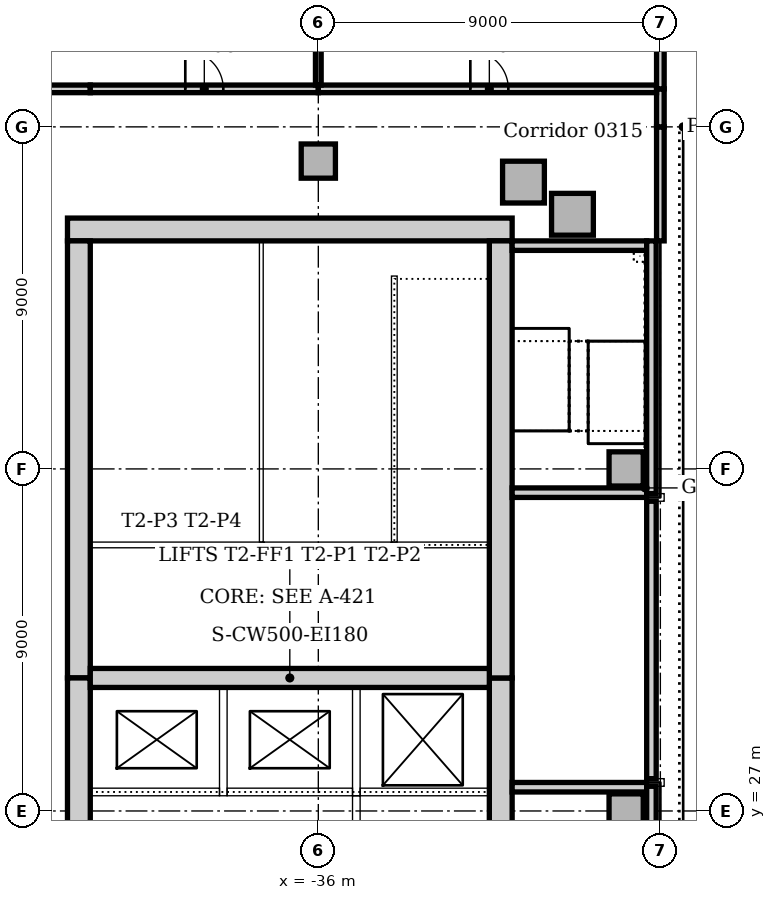
"""IFC4 building model, lengths in metres.
Left out: names, types, materials, properties, quantities, classifications, styles, units other than length and angle.
Written with IfcOpenShell. Run it as: python <this file> out.ifc"""

import sys

from ifc_helpers import new_model, si_unit, direction, frame, frame_2d, origin, origin_2d, place, context, subcontext, project, spatial, rectangle, extrude, element, fill, save


model = new_model("IFC4")
c1 = context("Model", 3, precision=1e-05, world=origin(), true_north=direction((0.0, 1.0)))
c2 = subcontext(c1, "Body", "Model", "MODEL_VIEW")
j1 = project(units=[si_unit("LENGTHUNIT", "METRE"), si_unit("PLANEANGLEUNIT", "RADIAN")], contexts=[c1])
p1 = place(None, origin())
s1 = spatial("IfcSite", under=j1, at=p1, CompositionType="ELEMENT")
p2 = place(p1, origin())
s2 = spatial("IfcBuilding", under=s1, at=p2, CompositionType="ELEMENT")
p3 = place(p2, frame((0.0, 0.0, 16.0)))
s3 = spatial("IfcBuildingStorey", under=s2, at=p3, CompositionType="ELEMENT", Elevation=16.0)
p4 = place(p3, frame((-30.9, 42.3, 0.0), z_axis=(0.0, 0.0, 1.0), x_axis=(-1.0, 0.0, 0.0)))
e1 = element("IfcWall", 1, at=p4, inside=s3, PredefinedType="SOLIDWALL", context=c2, shape_type="SweptSolid", body=[
    extrude(rectangle(XDim=11.7, YDim=0.6, at=frame_2d((5.85, 0.0))), origin(), (0.0, 0.0, 1.0), 5.0),
])
p5 = place(p3, frame((-31.2, 21.0, 0.0), z_axis=(0.0, 0.0, 1.0), x_axis=(0.0, 1.0, 0.0)))
e2 = element("IfcWall", 2, at=p5, inside=s3, PredefinedType="SOLIDWALL", context=c2, shape_type="SweptSolid", body=[
    extrude(rectangle(XDim=9.5, YDim=0.6, at=frame_2d((4.75, 0.0))), origin(), (0.0, 0.0, 1.0), 5.0),
])
p6 = place(p5, frame((5.25, 0.0, 0.0)))
e3 = element("IfcOpeningElement", 3, at=p6, cuts=e2, PredefinedType="OPENING", context=c2, shape_type="SweptSolid", body=[
    extrude(rectangle(XDim=1.0, YDim=2.1, at=frame_2d((0.5, 1.05))), frame((0.0, 0.31, 0.0), z_axis=(0.0, -1.0, 0.0), x_axis=(1.0, 0.0, 0.0)), (0.0, 0.0, 1.0), 0.62),
])
p7 = place(p3, frame((-31.2, 30.5, 0.0), z_axis=(0.0, 0.0, 1.0), x_axis=(0.0, 1.0, 0.0)))
e4 = element("IfcWall", 4, at=p7, inside=s3, PredefinedType="SOLIDWALL", context=c2, shape_type="SweptSolid", body=[
    extrude(rectangle(XDim=11.5, YDim=0.6, at=frame_2d((5.75, 0.0))), origin(), (0.0, 0.0, 1.0), 5.0),
])
p8 = place(p7, frame((0.85, 0.0, 0.0)))
e5 = element("IfcOpeningElement", 5, at=p8, cuts=e4, PredefinedType="OPENING", context=c2, shape_type="SweptSolid", body=[
    extrude(rectangle(XDim=1.8, YDim=2.1, at=frame_2d((0.9, 1.05))), frame((0.0, 0.31, 0.0), z_axis=(0.0, -1.0, 0.0), x_axis=(1.0, 0.0, 0.0)), (0.0, 0.0, 1.0), 0.62),
])
p9 = place(p3, frame((-42.3, 42.0, 0.0), z_axis=(0.0, 0.0, 1.0), x_axis=(0.0, -1.0, 0.0)))
e6 = element("IfcWall", 6, at=p9, inside=s3, PredefinedType="SOLIDWALL", context=c2, shape_type="SweptSolid", body=[
    extrude(rectangle(XDim=11.5, YDim=0.6, at=frame_2d((5.75, 0.0))), origin(), (0.0, 0.0, 1.0), 5.0),
])
p10 = place(p9, frame((8.85, 0.0, 0.0)))
e7 = element("IfcOpeningElement", 7, at=p10, cuts=e6, PredefinedType="OPENING", context=c2, shape_type="SweptSolid", body=[
    extrude(rectangle(XDim=1.8, YDim=2.1, at=frame_2d((0.9, 1.05))), frame((0.0, 0.31, 0.0), z_axis=(0.0, -1.0, 0.0), x_axis=(1.0, 0.0, 0.0)), (0.0, 0.0, 1.0), 0.62),
])
p11 = place(p3, frame((-42.3, 30.5, 0.0), z_axis=(0.0, 0.0, 1.0), x_axis=(0.0, -1.0, 0.0)))
e8 = element("IfcWall", 8, at=p11, inside=s3, PredefinedType="SOLIDWALL", context=c2, shape_type="SweptSolid", body=[
    extrude(rectangle(XDim=9.5, YDim=0.6, at=frame_2d((4.75, 0.0))), origin(), (0.0, 0.0, 1.0), 5.0),
])
p12 = place(p11, frame((3.85, 0.0, 0.0)))
e9 = element("IfcOpeningElement", 9, at=p12, cuts=e8, PredefinedType="OPENING", context=c2, shape_type="SweptSolid", body=[
    extrude(rectangle(XDim=1.8, YDim=2.1, at=frame_2d((0.9, 1.05))), frame((0.0, 0.31, 0.0), z_axis=(0.0, -1.0, 0.0), x_axis=(1.0, 0.0, 0.0)), (0.0, 0.0, 1.0), 0.62),
])
p13 = place(p3, frame((-42.0, 30.5, 0.0), z_axis=(0.0, 0.0, 1.0), x_axis=(1.0, 0.0, 0.0)))
e10 = element("IfcWall", 10, at=p13, inside=s3, PredefinedType="SOLIDWALL", context=c2, shape_type="SweptSolid", body=[
    extrude(rectangle(XDim=10.5, YDim=0.5, at=frame_2d((5.25, 0.0))), origin(), (0.0, 0.0, 1.0), 5.0),
])
p14 = place(p3, frame((-27.36, 27.625, 0.0), z_axis=(0.0, 0.0, 1.0), x_axis=(-1.0, 0.0, 0.0)))
e11 = element("IfcWall", 11, at=p14, inside=s3, PredefinedType="SOLIDWALL", context=c2, shape_type="SweptSolid", body=[
    extrude(rectangle(XDim=3.54, YDim=0.25, at=frame_2d((1.77, 0.0))), origin(), (0.0, 0.0, 1.0), 5.0),
])
p15 = place(p14, frame((1.69, 0.0, 0.0)))
e12 = element("IfcOpeningElement", 12, at=p15, cuts=e11, PredefinedType="OPENING", context=c2, shape_type="SweptSolid", body=[
    extrude(rectangle(XDim=1.1, YDim=2.1, at=frame_2d((0.55, 1.05))), frame((0.0, 0.135, 0.0), z_axis=(0.0, -1.0, 0.0), x_axis=(1.0, 0.0, 0.0)), (0.0, 0.0, 1.0), 0.27),
])
p16 = place(p3, frame((-30.9, 35.375, 0.0), z_axis=(0.0, 0.0, 1.0), x_axis=(1.0, 0.0, 0.0)))
e13 = element("IfcWall", 13, at=p16, inside=s3, PredefinedType="SOLIDWALL", context=c2, shape_type="SweptSolid", body=[
    extrude(rectangle(XDim=3.54, YDim=0.25, at=frame_2d((1.77, 0.0))), origin(), (0.0, 0.0, 1.0), 5.0),
])
p17 = place(p16, frame((0.75, 0.0, 0.0)))
e14 = element("IfcOpeningElement", 14, at=p17, cuts=e13, PredefinedType="OPENING", context=c2, shape_type="SweptSolid", body=[
    extrude(rectangle(XDim=1.1, YDim=2.1, at=frame_2d((0.55, 1.05))), frame((0.0, 0.135, 0.0), z_axis=(0.0, -1.0, 0.0), x_axis=(1.0, 0.0, 0.0)), (0.0, 0.0, 1.0), 0.27),
])
p18 = place(p3, frame((-27.36, 41.875, 0.0), z_axis=(0.0, 0.0, 1.0), x_axis=(-1.0, 0.0, 0.0)))
e15 = element("IfcWall", 15, at=p18, inside=s3, PredefinedType="SOLIDWALL", context=c2, shape_type="SweptSolid", body=[
    extrude(rectangle(XDim=3.54, YDim=0.25, at=frame_2d((1.77, 0.0))), origin(), (0.0, 0.0, 1.0), 5.0),
])
p19 = place(p3, frame((-27.235, 21.0, 0.0), z_axis=(0.0, 0.0, 1.0), x_axis=(0.0, 1.0, 0.0)))
e16 = element("IfcWall", 16, at=p19, inside=s3, PredefinedType="SOLIDWALL", context=c2, shape_type="SweptSolid", body=[
    extrude(rectangle(XDim=6.65, YDim=0.25, at=frame_2d((3.325, 0.0))), origin(), (0.0, 0.0, 1.0), 5.0),
])
p20 = place(p3, frame((-27.235, 27.85, 0.0), z_axis=(0.0, 0.0, 1.0), x_axis=(0.0, 1.0, 0.0)))
e17 = element("IfcWall", 17, at=p20, inside=s3, PredefinedType="SOLIDWALL", context=c2, shape_type="SweptSolid", body=[
    extrude(rectangle(XDim=7.3, YDim=0.25, at=frame_2d((3.65, 0.0))), origin(), (0.0, 0.0, 1.0), 5.0),
])
p21 = place(p3, frame((-27.235, 35.35, 0.0), z_axis=(0.0, 0.0, 1.0), x_axis=(0.0, 1.0, 0.0)))
e18 = element("IfcWall", 18, at=p21, inside=s3, PredefinedType="SOLIDWALL", context=c2, shape_type="SweptSolid", body=[
    extrude(rectangle(XDim=6.65, YDim=0.25, at=frame_2d((3.325, 0.0))), origin(), (0.0, 0.0, 1.0), 5.0),
])
for number, where, z_axis, x_axis in (
    (19, (-29.313, 42.7, 0.0), (0.0, 0.0, 1.0), (1.0, 0.0, 0.0)),
    (20, (-30.602, 43.547, 0.0), (0.0, 0.0, 1.0), (1.0, 0.0, 0.0)),
):
    element("IfcColumn", number, at=place(p3, frame(where, z_axis=z_axis, x_axis=x_axis)), inside=s3, PredefinedType="COLUMN", context=c2, shape_type="SweptSolid", body=[
        extrude(rectangle(XDim=1.1, YDim=1.1, at=origin_2d()), origin(), (0.0, 0.0, 1.0), 4.7),
    ])
for number, where, z_axis, x_axis in (
    (21, (-27.9, 27.0, 0.0), (0.0, 0.0, 1.0), (1.0, 0.0, 0.0)),
    (22, (-27.9, 36.0, 0.0), (0.0, 0.0, 1.0), (1.0, 0.0, 0.0)),
):
    element("IfcColumn", number, at=place(p3, frame(where, z_axis=z_axis, x_axis=x_axis)), inside=s3, PredefinedType="COLUMN", context=c2, shape_type="SweptSolid", body=[
        extrude(rectangle(XDim=0.9, YDim=0.9, at=origin_2d()), origin(), (0.0, 0.0, 1.0), 5.0),
    ])
p22 = place(p3, frame((-36.0, 44.1, 0.0), z_axis=(0.0, 0.0, 1.0), x_axis=(1.0, 0.0, 0.0)))
e23 = element("IfcColumn", 23, at=p22, inside=s3, PredefinedType="COLUMN", context=c2, shape_type="SweptSolid", body=[
    extrude(rectangle(XDim=0.9, YDim=0.9, at=origin_2d()), origin(), (0.0, 0.0, 1.0), 4.7),
])
p23 = place(p3, frame((-44.9, 46.0, 0.0), z_axis=(0.0, 0.0, 1.0), x_axis=(1.0, 0.0, 0.0)))
e24 = element("IfcWall", 24, at=p23, inside=s3, PredefinedType="PARTITIONING", context=c2, shape_type="SweptSolid", body=[
    extrude(rectangle(XDim=2.9, YDim=0.2, at=frame_2d((1.45, 0.0))), origin(), (0.0, 0.0, 1.0), 4.7),
])
p24 = place(p3, frame((-27.0, 42.0, 0.0), z_axis=(0.0, 0.0, 1.0), x_axis=(0.0, 1.0, 0.0)))
e25 = element("IfcWall", 25, at=p24, inside=s3, PredefinedType="PARTITIONING", context=c2, shape_type="SweptSolid", body=[
    extrude(rectangle(XDim=3.0, YDim=0.2, at=frame_2d((1.5, 0.0))), origin(), (0.0, 0.0, 1.0), 4.7),
])
p25 = place(p3, frame((-27.0, 45.0, 0.0), z_axis=(0.0, 0.0, 1.0), x_axis=(0.0, 1.0, 0.0)))
e26 = element("IfcWall", 26, at=p25, inside=s3, PredefinedType="PARTITIONING", context=c2, shape_type="SweptSolid", body=[
    extrude(rectangle(XDim=1.0, YDim=0.2, at=frame_2d((0.5, 0.0))), origin(), (0.0, 0.0, 1.0), 4.7),
])
p26 = place(p3, frame((-42.0, 46.0, 0.0), z_axis=(0.0, 0.0, 1.0), x_axis=(1.0, 0.0, 0.0)))
e27 = element("IfcWall", 27, at=p26, inside=s3, PredefinedType="PARTITIONING", context=c2, shape_type="SweptSolid", body=[
    extrude(rectangle(XDim=6.0, YDim=0.2, at=frame_2d((3.0, 0.0))), origin(), (0.0, 0.0, 1.0), 4.7),
])
p27 = place(p26, frame((2.5, 0.0, 0.0)))
e28 = element("IfcOpeningElement", 28, at=p27, cuts=e27, PredefinedType="OPENING", context=c2, shape_type="SweptSolid", body=[
    extrude(rectangle(XDim=1.0, YDim=2.1, at=frame_2d((0.5, 1.05))), frame((0.0, 0.11, 0.0), z_axis=(0.0, -1.0, 0.0), x_axis=(1.0, 0.0, 0.0)), (0.0, 0.0, 1.0), 0.22),
])
p28 = place(p3, frame((-36.0, 46.0, 0.0), z_axis=(0.0, 0.0, 1.0), x_axis=(1.0, 0.0, 0.0)))
e29 = element("IfcWall", 29, at=p28, inside=s3, PredefinedType="PARTITIONING", context=c2, shape_type="SweptSolid", body=[
    extrude(rectangle(XDim=8.9, YDim=0.2, at=frame_2d((4.45, 0.0))), origin(), (0.0, 0.0, 1.0), 4.7),
])
p29 = place(p28, frame((4.0, 0.0, 0.0)))
e30 = element("IfcOpeningElement", 30, at=p29, cuts=e29, PredefinedType="OPENING", context=c2, shape_type="SweptSolid", body=[
    extrude(rectangle(XDim=1.0, YDim=2.1, at=frame_2d((0.5, 1.05))), frame((0.0, 0.11, 0.0), z_axis=(0.0, -1.0, 0.0), x_axis=(1.0, 0.0, 0.0)), (0.0, 0.0, 1.0), 0.22),
])
p30 = place(p3, frame((-27.0, 46.0, 0.0), z_axis=(0.0, 0.0, 1.0), x_axis=(0.0, 1.0, 0.0)))
e31 = element("IfcWall", 31, at=p30, inside=s3, PredefinedType="PARTITIONING", context=c2, shape_type="SweptSolid", body=[
    extrude(rectangle(XDim=6.0, YDim=0.2, at=frame_2d((3.0, 0.0))), origin(), (0.0, 0.0, 1.0), 4.7),
])
p31 = place(p3, frame((-36.0, 46.1, 0.0), z_axis=(0.0, 0.0, 1.0), x_axis=(0.0, 1.0, 0.0)))
e32 = element("IfcWall", 32, at=p31, inside=s3, PredefinedType="PARTITIONING", context=c2, shape_type="SweptSolid", body=[
    extrude(rectangle(XDim=7.43, YDim=0.15, at=frame_2d((3.715, 0.0))), origin(), (0.0, 0.0, 1.0), 4.7),
])
p32 = place(p3, frame((-38.5, 27.4, 0.0), z_axis=(0.0, 0.0, 1.0), x_axis=(0.0, 1.0, 0.0)))
e33 = element("IfcWall", 33, at=p32, inside=s3, PredefinedType="SOLIDWALL", context=c2, shape_type="SweptSolid", body=[
    extrude(rectangle(XDim=2.85, YDim=0.2, at=frame_2d((1.425, 0.0))), origin(), (0.0, 0.0, 1.0), 5.0),
])
p33 = place(p3, frame((-42.0, 27.5, 0.0), z_axis=(0.0, 0.0, 1.0), x_axis=(1.0, 0.0, 0.0)))
e34 = element("IfcWall", 34, at=p33, inside=s3, PredefinedType="SOLIDWALL", context=c2, shape_type="SweptSolid", body=[
    extrude(rectangle(XDim=3.4, YDim=0.2, at=frame_2d((1.7, 0.0))), origin(), (0.0, 0.0, 1.0), 5.0),
])
p34 = place(p33, frame((1.5, 0.0, 0.0)))
e35 = element("IfcOpeningElement", 35, at=p34, cuts=e34, PredefinedType="OPENING", context=c2, shape_type="SweptSolid", body=[
    extrude(rectangle(XDim=1.1, YDim=2.1, at=frame_2d((0.55, 1.05))), frame((0.0, 0.11, 0.0), z_axis=(0.0, -1.0, 0.0), x_axis=(1.0, 0.0, 0.0)), (0.0, 0.0, 1.0), 0.22),
])
p35 = place(p3, frame((-35.0, 27.4, 0.0), z_axis=(0.0, 0.0, 1.0), x_axis=(0.0, 1.0, 0.0)))
e36 = element("IfcWall", 36, at=p35, inside=s3, PredefinedType="SOLIDWALL", context=c2, shape_type="SweptSolid", body=[
    extrude(rectangle(XDim=2.85, YDim=0.2, at=frame_2d((1.425, 0.0))), origin(), (0.0, 0.0, 1.0), 5.0),
])
p36 = place(p3, frame((-38.4, 27.5, 0.0), z_axis=(0.0, 0.0, 1.0), x_axis=(1.0, 0.0, 0.0)))
e37 = element("IfcWall", 37, at=p36, inside=s3, PredefinedType="SOLIDWALL", context=c2, shape_type="SweptSolid", body=[
    extrude(rectangle(XDim=3.3, YDim=0.2, at=frame_2d((1.65, 0.0))), origin(), (0.0, 0.0, 1.0), 5.0),
])
p37 = place(p36, frame((1.1, 0.0, 0.0)))
e38 = element("IfcOpeningElement", 38, at=p37, cuts=e37, PredefinedType="OPENING", context=c2, shape_type="SweptSolid", body=[
    extrude(rectangle(XDim=1.1, YDim=2.1, at=frame_2d((0.55, 1.05))), frame((0.0, 0.11, 0.0), z_axis=(0.0, -1.0, 0.0), x_axis=(1.0, 0.0, 0.0)), (0.0, 0.0, 1.0), 0.22),
])
p38 = place(p3, frame((-34.9, 27.5, 0.0), z_axis=(0.0, 0.0, 1.0), x_axis=(1.0, 0.0, 0.0)))
e39 = element("IfcWall", 39, at=p38, inside=s3, PredefinedType="SOLIDWALL", context=c2, shape_type="SweptSolid", body=[
    extrude(rectangle(XDim=3.4, YDim=0.2, at=frame_2d((1.7, 0.0))), origin(), (0.0, 0.0, 1.0), 5.0),
])
p39 = place(p38, frame((1.1, 0.0, 0.0)))
e40 = element("IfcOpeningElement", 40, at=p39, cuts=e39, PredefinedType="OPENING", context=c2, shape_type="SweptSolid", body=[
    extrude(rectangle(XDim=1.1, YDim=2.1, at=frame_2d((0.55, 1.05))), frame((0.0, 0.11, 0.0), z_axis=(0.0, -1.0, 0.0), x_axis=(1.0, 0.0, 0.0)), (0.0, 0.0, 1.0), 0.22),
])
p40 = place(p3, frame((-35.0, 24.1, 0.0), z_axis=(0.0, 0.0, 1.0), x_axis=(0.0, 1.0, 0.0)))
e41 = element("IfcWall", 41, at=p40, inside=s3, PredefinedType="SOLIDWALL", context=c2, shape_type="SweptSolid", body=[
    extrude(rectangle(XDim=3.3, YDim=0.2, at=frame_2d((1.65, 0.0))), origin(), (0.0, 0.0, 1.0), 5.0),
])
p41 = place(p40, frame((1.15, 0.0, 0.0)))
e42 = element("IfcOpeningElement", 42, at=p41, cuts=e41, PredefinedType="OPENING", context=c2, shape_type="SweptSolid", body=[
    extrude(rectangle(XDim=1.0, YDim=2.1, at=frame_2d((0.5, 1.05))), frame((0.0, 0.11, 0.0), z_axis=(0.0, -1.0, 0.0), x_axis=(1.0, 0.0, 0.0)), (0.0, 0.0, 1.0), 0.22),
])
for number, where, z_axis, x_axis in (
    (43, (-27.36, 27.75, 0.0), (0.0, 0.0, 1.0), (1.0, 0.0, 0.0)),
    (44, (-26.9, 35.25, 0.0), (0.0, 0.0, 1.0), (-1.0, 0.0, 0.0)),
):
    element("IfcWall", number, at=place(p3, frame(where, z_axis=z_axis, x_axis=x_axis)), inside=s3, PredefinedType="SOLIDWALL", context=c2, shape_type="SweptSolid", body=[
        extrude(rectangle(XDim=0.46, YDim=0.2, at=frame_2d((0.23, 0.0))), origin(), (0.0, 0.0, 1.0), 5.0),
    ])
p42 = place(p3, frame((-34.075, 34.0, 0.0), z_axis=(0.0, 0.0, 1.0), x_axis=(1.0, 0.0, 0.0)))
e45 = element("IfcWall", 45, at=p42, inside=s3, PredefinedType="SOLIDWALL", context=c2, shape_type="SweptSolid", body=[
    extrude(rectangle(XDim=2.575, YDim=0.15, at=frame_2d((1.288, 0.0))), origin(), (0.0, 0.0, 1.0), 5.0),
])
p43 = place(p3, frame((-34.0, 41.075, 0.0), z_axis=(0.0, 0.0, 1.0), x_axis=(0.0, -1.0, 0.0)))
e46 = element("IfcWall", 46, at=p43, inside=s3, PredefinedType="SOLIDWALL", context=c2, shape_type="SweptSolid", body=[
    extrude(rectangle(XDim=7.0, YDim=0.15, at=frame_2d((3.5, 0.0))), origin(), (0.0, 0.0, 1.0), 5.0),
])
p44 = place(p3, frame((-37.425, 34.0, 0.0), z_axis=(0.0, 0.0, 1.0), x_axis=(-1.0, 0.0, 0.0)))
e47 = element("IfcWall", 47, at=p44, inside=s3, PredefinedType="PARTITIONING", context=c2, shape_type="SweptSolid", body=[
    extrude(rectangle(XDim=4.575, YDim=0.15, at=frame_2d((2.288, 0.0))), origin(), (0.0, 0.0, 1.0), 4.7),
])
p45 = place(p44, frame((1.925, 0.0, 0.0)))
e48 = element("IfcOpeningElement", 48, at=p45, cuts=e47, PredefinedType="OPENING", context=c2, shape_type="SweptSolid", body=[
    extrude(rectangle(XDim=0.8, YDim=2.1, at=frame_2d((0.4, 1.05))), frame((0.0, 0.085, 0.0), z_axis=(0.0, -1.0, 0.0), x_axis=(1.0, 0.0, 0.0)), (0.0, 0.0, 1.0), 0.17),
])
p46 = place(p3, frame((-34.075, 34.0, 0.0), z_axis=(0.0, 0.0, 1.0), x_axis=(-1.0, 0.0, 0.0)))
e49 = element("IfcWall", 49, at=p46, inside=s3, PredefinedType="PARTITIONING", context=c2, shape_type="SweptSolid", body=[
    extrude(rectangle(XDim=3.35, YDim=0.15, at=frame_2d((1.675, 0.0))), origin(), (0.0, 0.0, 1.0), 4.7),
])
p47 = place(p46, frame((1.275, 0.0, 0.0)))
e50 = element("IfcOpeningElement", 50, at=p47, cuts=e49, PredefinedType="OPENING", context=c2, shape_type="SweptSolid", body=[
    extrude(rectangle(XDim=0.8, YDim=2.1, at=frame_2d((0.4, 1.05))), frame((0.0, 0.085, 0.0), z_axis=(0.0, -1.0, 0.0), x_axis=(1.0, 0.0, 0.0)), (0.0, 0.0, 1.0), 0.17),
])
p48 = place(p3, frame((-37.5, 34.075, 0.0), z_axis=(0.0, 0.0, 1.0), x_axis=(0.0, 1.0, 0.0)))
e51 = element("IfcWall", 51, at=p48, inside=s3, PredefinedType="PARTITIONING", context=c2, shape_type="SweptSolid", body=[
    extrude(rectangle(XDim=7.925, YDim=0.1, at=frame_2d((3.962, 0.0))), origin(), (0.0, 0.0, 1.0), 4.7),
])
p49 = place(p27, origin())
e52 = element("IfcDoor", 52, at=p49, inside=s3, OperationType="SINGLE_SWING_LEFT", PredefinedType="DOOR", context=c2, shape_type="SweptSolid", body=[
    extrude(rectangle(XDim=1.0, YDim=2.1, at=frame_2d((0.5, 1.05))), frame((0.0, 0.025, 0.0), z_axis=(0.0, -1.0, 0.0), x_axis=(1.0, 0.0, 0.0)), (0.0, 0.0, 1.0), 0.05),
])
fill(e28, e52)
p50 = place(p29, origin())
e53 = element("IfcDoor", 53, at=p50, inside=s3, OperationType="SINGLE_SWING_LEFT", PredefinedType="DOOR", context=c2, shape_type="SweptSolid", body=[
    extrude(rectangle(XDim=1.0, YDim=2.1, at=frame_2d((0.5, 1.05))), frame((0.0, 0.025, 0.0), z_axis=(0.0, -1.0, 0.0), x_axis=(1.0, 0.0, 0.0)), (0.0, 0.0, 1.0), 0.05),
])
fill(e30, e53)
p51 = place(p34, origin())
e54 = element("IfcDoor", 54, at=p51, inside=s3, OperationType="SLIDING_TO_LEFT", PredefinedType="DOOR", context=c2, shape_type="SweptSolid", body=[
    extrude(rectangle(XDim=1.1, YDim=2.1, at=frame_2d((0.55, 1.05))), frame((0.0, 0.025, 0.0), z_axis=(0.0, -1.0, 0.0), x_axis=(1.0, 0.0, 0.0)), (0.0, 0.0, 1.0), 0.05),
])
fill(e35, e54)
p52 = place(p37, origin())
e55 = element("IfcDoor", 55, at=p52, inside=s3, OperationType="SLIDING_TO_LEFT", PredefinedType="DOOR", context=c2, shape_type="SweptSolid", body=[
    extrude(rectangle(XDim=1.1, YDim=2.1, at=frame_2d((0.55, 1.05))), frame((0.0, 0.025, 0.0), z_axis=(0.0, -1.0, 0.0), x_axis=(1.0, 0.0, 0.0)), (0.0, 0.0, 1.0), 0.05),
])
fill(e38, e55)
p53 = place(p39, origin())
e56 = element("IfcDoor", 56, at=p53, inside=s3, OperationType="SLIDING_TO_LEFT", PredefinedType="DOOR", context=c2, shape_type="SweptSolid", body=[
    extrude(rectangle(XDim=1.1, YDim=2.1, at=frame_2d((0.55, 1.05))), frame((0.0, 0.025, 0.0), z_axis=(0.0, -1.0, 0.0), x_axis=(1.0, 0.0, 0.0)), (0.0, 0.0, 1.0), 0.05),
])
fill(e40, e56)
p54 = place(p6, frame((1.0, 0.0, 0.0), z_axis=(0.0, 0.0, 1.0), x_axis=(-1.0, 0.0, 0.0)))
e57 = element("IfcDoor", 57, at=p54, inside=s3, OperationType="SINGLE_SWING_LEFT", PredefinedType="DOOR", context=c2, shape_type="SweptSolid", body=[
    extrude(rectangle(XDim=1.0, YDim=2.1, at=frame_2d((0.5, 1.05))), frame((0.0, 0.025, 0.0), z_axis=(0.0, -1.0, 0.0), x_axis=(1.0, 0.0, 0.0)), (0.0, 0.0, 1.0), 0.05),
])
fill(e3, e57)
p55 = place(p15, origin())
e58 = element("IfcDoor", 58, at=p55, inside=s3, OperationType="SINGLE_SWING_LEFT", PredefinedType="DOOR", context=c2, shape_type="SweptSolid", body=[
    extrude(rectangle(XDim=1.1, YDim=2.1, at=frame_2d((0.55, 1.05))), frame((0.0, 0.025, 0.0), z_axis=(0.0, -1.0, 0.0), x_axis=(1.0, 0.0, 0.0)), (0.0, 0.0, 1.0), 0.05),
])
fill(e12, e58)
p56 = place(p17, origin())
e59 = element("IfcDoor", 59, at=p56, inside=s3, OperationType="SINGLE_SWING_RIGHT", PredefinedType="DOOR", context=c2, shape_type="SweptSolid", body=[
    extrude(rectangle(XDim=1.1, YDim=2.1, at=frame_2d((0.55, 1.05))), frame((0.0, 0.025, 0.0), z_axis=(0.0, -1.0, 0.0), x_axis=(1.0, 0.0, 0.0)), (0.0, 0.0, 1.0), 0.05),
])
fill(e14, e59)
p57 = place(p8, origin())
e60 = element("IfcDoor", 60, at=p57, inside=s3, OperationType="DOUBLE_DOOR_SINGLE_SWING", PredefinedType="DOOR", context=c2, shape_type="SweptSolid", body=[
    extrude(rectangle(XDim=1.8, YDim=2.1, at=frame_2d((0.9, 1.05))), frame((0.0, 0.025, 0.0), z_axis=(0.0, -1.0, 0.0), x_axis=(1.0, 0.0, 0.0)), (0.0, 0.0, 1.0), 0.05),
])
fill(e5, e60)
p58 = place(p10, frame((1.8, 0.0, 0.0), z_axis=(0.0, 0.0, 1.0), x_axis=(-1.0, 0.0, 0.0)))
e61 = element("IfcDoor", 61, at=p58, inside=s3, OperationType="DOUBLE_DOOR_SINGLE_SWING", PredefinedType="DOOR", context=c2, shape_type="SweptSolid", body=[
    extrude(rectangle(XDim=1.8, YDim=2.1, at=frame_2d((0.9, 1.05))), frame((0.0, 0.025, 0.0), z_axis=(0.0, -1.0, 0.0), x_axis=(1.0, 0.0, 0.0)), (0.0, 0.0, 1.0), 0.05),
])
fill(e7, e61)
p59 = place(p45, frame((0.8, 0.0, 0.0), z_axis=(0.0, 0.0, 1.0), x_axis=(-1.0, 0.0, 0.0)))
e62 = element("IfcDoor", 62, at=p59, inside=s3, OperationType="SINGLE_SWING_LEFT", PredefinedType="DOOR", context=c2, shape_type="SweptSolid", body=[
    extrude(rectangle(XDim=0.8, YDim=2.1, at=frame_2d((0.4, 1.05))), frame((0.0, 0.025, 0.0), z_axis=(0.0, -1.0, 0.0), x_axis=(1.0, 0.0, 0.0)), (0.0, 0.0, 1.0), 0.05),
])
fill(e48, e62)
p60 = place(p47, frame((0.8, 0.0, 0.0), z_axis=(0.0, 0.0, 1.0), x_axis=(-1.0, 0.0, 0.0)))
e63 = element("IfcDoor", 63, at=p60, inside=s3, OperationType="SINGLE_SWING_RIGHT", PredefinedType="DOOR", context=c2, shape_type="SweptSolid", body=[
    extrude(rectangle(XDim=0.8, YDim=2.1, at=frame_2d((0.4, 1.05))), frame((0.0, 0.025, 0.0), z_axis=(0.0, -1.0, 0.0), x_axis=(1.0, 0.0, 0.0)), (0.0, 0.0, 1.0), 0.05),
])
fill(e50, e63)
save(model, sys.argv[1])
